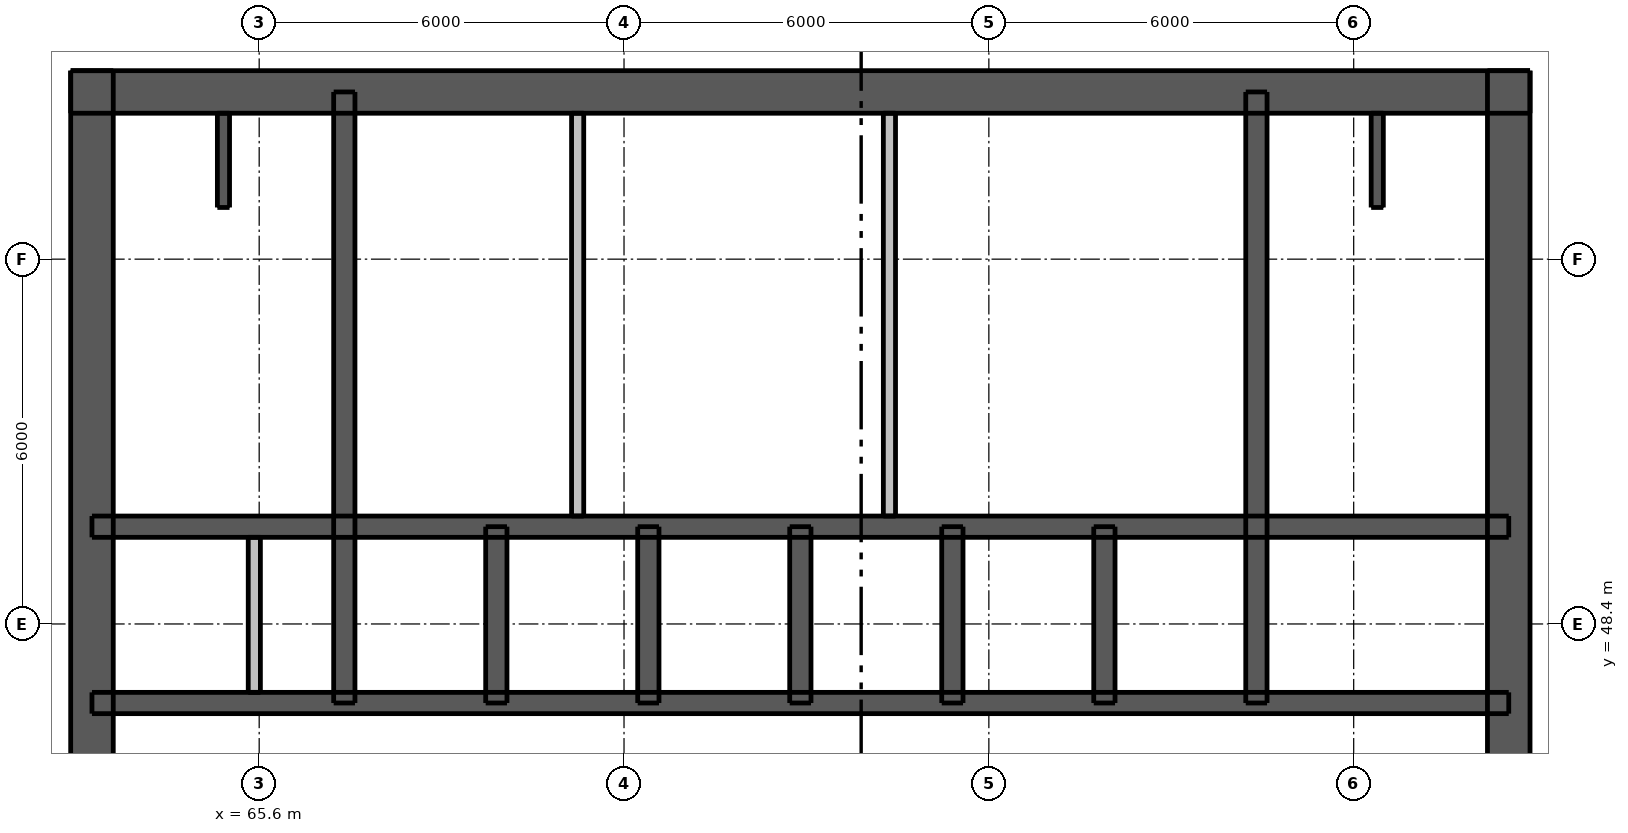
"""IFC4 building model, lengths in metres.
Left out: names, types, materials, properties, quantities, classifications, styles, units other than length and angle.
Written with IfcOpenShell. Run it as: python <this file> out.ifc"""

import sys

from ifc_helpers import new_model, si_unit, direction, frame, frame_2d, origin, place, context, subcontext, project, spatial, rectangle, extrude, element, fill, save


model = new_model("IFC4")
c1 = context("Model", 3, precision=1e-05, world=origin(), true_north=direction((0.0, 1.0)))
c2 = subcontext(c1, "Body", "Model", "MODEL_VIEW")
j1 = project(units=[si_unit("LENGTHUNIT", "METRE"), si_unit("PLANEANGLEUNIT", "RADIAN")], contexts=[c1])
p1 = place(None, origin())
s1 = spatial("IfcSite", under=j1, at=p1, CompositionType="ELEMENT")
p2 = place(p1, origin())
s2 = spatial("IfcBuilding", under=s1, at=p2, CompositionType="ELEMENT")
p3 = place(p2, frame((0.0, 0.0, 178.0)))
s3 = spatial("IfcBuildingStorey", under=s2, at=p3, CompositionType="ELEMENT", Elevation=178.0)
p4 = place(p3, frame((62.5, 57.15, 0.0), z_axis=(0.0, 0.0, 1.0), x_axis=(1.0, 0.0, 0.0)))
e1 = element("IfcWall", 1, at=p4, inside=s3, PredefinedType="SHEAR", context=c2, shape_type="SweptSolid", body=[
    extrude(rectangle(XDim=24.0, YDim=0.7, at=frame_2d((12.0, 0.0))), origin(), (0.0, 0.0, 1.0), 8.75),
])
p5 = place(p4, frame((19.875, 0.0, 0.0)))
e2 = element("IfcOpeningElement", 2, at=p5, cuts=e1, PredefinedType="OPENING", context=c2, shape_type="SweptSolid", body=[
    extrude(rectangle(XDim=1.1, YDim=2.1, at=frame_2d((0.55, 1.05))), frame((0.0, 0.36, 0.0), z_axis=(0.0, -1.0, 0.0), x_axis=(1.0, 0.0, 0.0)), (0.0, 0.0, 1.0), 0.72),
])
p6 = place(p4, frame((22.0, 0.0, 0.0)))
e3 = element("IfcOpeningElement", 3, at=p6, cuts=e1, PredefinedType="OPENING", context=c2, shape_type="SweptSolid", body=[
    extrude(rectangle(XDim=1.1, YDim=2.1, at=frame_2d((0.55, 1.05))), frame((0.0, 0.36, 0.0), z_axis=(0.0, -1.0, 0.0), x_axis=(1.0, 0.0, 0.0)), (0.0, 0.0, 1.0), 0.72),
])
p7 = place(p4, frame((0.9, 0.0, 0.0)))
e4 = element("IfcOpeningElement", 4, at=p7, cuts=e1, PredefinedType="OPENING", context=c2, shape_type="SweptSolid", body=[
    extrude(rectangle(XDim=1.1, YDim=2.1, at=frame_2d((0.55, 1.05))), frame((0.0, 0.36, 0.0), z_axis=(0.0, -1.0, 0.0), x_axis=(1.0, 0.0, 0.0)), (0.0, 0.0, 1.0), 0.72),
])
p8 = place(p4, frame((3.025, 0.0, 0.0)))
e5 = element("IfcOpeningElement", 5, at=p8, cuts=e1, PredefinedType="OPENING", context=c2, shape_type="SweptSolid", body=[
    extrude(rectangle(XDim=1.1, YDim=2.1, at=frame_2d((0.55, 1.05))), frame((0.0, 0.36, 0.0), z_axis=(0.0, -1.0, 0.0), x_axis=(1.0, 0.0, 0.0)), (0.0, 0.0, 1.0), 0.72),
])
p9 = place(p4, frame((6.056, 0.0, 0.0)))
e6 = element("IfcOpeningElement", 6, at=p9, cuts=e1, PredefinedType="OPENING", context=c2, shape_type="SweptSolid", body=[
    extrude(rectangle(XDim=0.9, YDim=2.1, at=frame_2d((0.45, 1.05))), frame((0.0, 0.36, 0.0), z_axis=(0.0, -1.0, 0.0), x_axis=(1.0, 0.0, 0.0)), (0.0, 0.0, 1.0), 0.72),
])
p10 = place(p4, frame((10.451, 0.0, 0.0)))
e7 = element("IfcOpeningElement", 7, at=p10, cuts=e1, PredefinedType="OPENING", context=c2, shape_type="SweptSolid", body=[
    extrude(rectangle(XDim=0.9, YDim=2.1, at=frame_2d((0.45, 1.05))), frame((0.0, 0.36, 0.0), z_axis=(0.0, -1.0, 0.0), x_axis=(1.0, 0.0, 0.0)), (0.0, 0.0, 1.0), 0.72),
])
p11 = place(p4, frame((16.115, 0.0, 0.0)))
e8 = element("IfcOpeningElement", 8, at=p11, cuts=e1, PredefinedType="OPENING", context=c2, shape_type="SweptSolid", body=[
    extrude(rectangle(XDim=0.9, YDim=2.1, at=frame_2d((0.45, 1.05))), frame((0.0, 0.36, 0.0), z_axis=(0.0, -1.0, 0.0), x_axis=(1.0, 0.0, 0.0)), (0.0, 0.0, 1.0), 0.72),
])
p12 = place(p3, frame((62.85, 33.5, 0.0), z_axis=(0.0, 0.0, 1.0), x_axis=(0.0, 1.0, 0.0)))
e9 = element("IfcWall", 9, at=p12, inside=s3, PredefinedType="SHEAR", context=c2, shape_type="SweptSolid", body=[
    extrude(rectangle(XDim=24.0, YDim=0.7, at=frame_2d((12.0, 0.0))), origin(), (0.0, 0.0, 1.0), 8.75),
])
p13 = place(p12, frame((11.2, 0.0, 0.0)))
e10 = element("IfcOpeningElement", 10, at=p13, cuts=e9, PredefinedType="OPENING", context=c2, shape_type="SweptSolid", body=[
    extrude(rectangle(XDim=1.6, YDim=2.1, at=frame_2d((0.8, 1.05))), frame((0.0, 0.36, 0.0), z_axis=(0.0, -1.0, 0.0), x_axis=(1.0, 0.0, 0.0)), (0.0, 0.0, 1.0), 0.72),
])
p14 = place(p3, frame((86.15, 33.5, 0.0), z_axis=(0.0, 0.0, 1.0), x_axis=(0.0, 1.0, 0.0)))
e11 = element("IfcWall", 11, at=p14, inside=s3, PredefinedType="SHEAR", context=c2, shape_type="SweptSolid", body=[
    extrude(rectangle(XDim=24.0, YDim=0.7, at=frame_2d((12.0, 0.0))), origin(), (0.0, 0.0, 1.0), 8.75),
])
p15 = place(p14, frame((11.2, 0.0, 0.0)))
e12 = element("IfcOpeningElement", 12, at=p15, cuts=e11, PredefinedType="OPENING", context=c2, shape_type="SweptSolid", body=[
    extrude(rectangle(XDim=1.6, YDim=2.1, at=frame_2d((0.8, 1.05))), frame((0.0, 0.36, 0.0), z_axis=(0.0, -1.0, 0.0), x_axis=(1.0, 0.0, 0.0)), (0.0, 0.0, 1.0), 0.72),
])
p16 = place(p3, frame((62.85, 47.1, 0.0), z_axis=(0.0, 0.0, 1.0), x_axis=(1.0, 0.0, 0.0)))
e13 = element("IfcWall", 13, at=p16, inside=s3, PredefinedType="SHEAR", context=c2, shape_type="SweptSolid", body=[
    extrude(rectangle(XDim=23.3, YDim=0.35, at=frame_2d((11.65, 0.0))), origin(), (0.0, 0.0, 1.0), 8.75),
])
p17 = place(p16, frame((1.06, 0.0, 0.0)))
e14 = element("IfcOpeningElement", 14, at=p17, cuts=e13, PredefinedType="OPENING", context=c2, shape_type="SweptSolid", body=[
    extrude(rectangle(XDim=0.9, YDim=2.1, at=frame_2d((0.45, 1.05))), frame((0.0, 0.185, 0.0), z_axis=(0.0, -1.0, 0.0), x_axis=(1.0, 0.0, 0.0)), (0.0, 0.0, 1.0), 0.37),
])
p18 = place(p16, frame((2.923, 0.0, 0.0)))
e15 = element("IfcOpeningElement", 15, at=p18, cuts=e13, PredefinedType="OPENING", context=c2, shape_type="SweptSolid", body=[
    extrude(rectangle(XDim=0.8, YDim=2.1, at=frame_2d((0.4, 1.05))), frame((0.0, 0.185, 0.0), z_axis=(0.0, -1.0, 0.0), x_axis=(1.0, 0.0, 0.0)), (0.0, 0.0, 1.0), 0.37),
])
p19 = place(p16, frame((20.688, 0.0, 0.0)))
e16 = element("IfcOpeningElement", 16, at=p19, cuts=e13, PredefinedType="OPENING", context=c2, shape_type="SweptSolid", body=[
    extrude(rectangle(XDim=0.9, YDim=2.1, at=frame_2d((0.45, 1.05))), frame((0.0, 0.185, 0.0), z_axis=(0.0, -1.0, 0.0), x_axis=(1.0, 0.0, 0.0)), (0.0, 0.0, 1.0), 0.37),
])
p20 = place(p16, frame((4.85, 0.0, 0.0)))
e17 = element("IfcOpeningElement", 17, at=p20, cuts=e13, PredefinedType="OPENING", context=c2, shape_type="SweptSolid", body=[
    extrude(rectangle(XDim=1.1, YDim=2.1, at=frame_2d((0.55, 1.05))), frame((0.0, 0.185, 0.0), z_axis=(0.0, -1.0, 0.0), x_axis=(1.0, 0.0, 0.0)), (0.0, 0.0, 1.0), 0.37),
])
p21 = place(p16, frame((7.35, 0.0, 0.0)))
e18 = element("IfcOpeningElement", 18, at=p21, cuts=e13, PredefinedType="OPENING", context=c2, shape_type="SweptSolid", body=[
    extrude(rectangle(XDim=1.1, YDim=2.1, at=frame_2d((0.55, 1.05))), frame((0.0, 0.185, 0.0), z_axis=(0.0, -1.0, 0.0), x_axis=(1.0, 0.0, 0.0)), (0.0, 0.0, 1.0), 0.37),
])
p22 = place(p16, frame((9.85, 0.0, 0.0)))
e19 = element("IfcOpeningElement", 19, at=p22, cuts=e13, PredefinedType="OPENING", context=c2, shape_type="SweptSolid", body=[
    extrude(rectangle(XDim=1.1, YDim=2.1, at=frame_2d((0.55, 1.05))), frame((0.0, 0.185, 0.0), z_axis=(0.0, -1.0, 0.0), x_axis=(1.0, 0.0, 0.0)), (0.0, 0.0, 1.0), 0.37),
])
p23 = place(p16, frame((12.35, 0.0, 0.0)))
e20 = element("IfcOpeningElement", 20, at=p23, cuts=e13, PredefinedType="OPENING", context=c2, shape_type="SweptSolid", body=[
    extrude(rectangle(XDim=1.1, YDim=2.1, at=frame_2d((0.55, 1.05))), frame((0.0, 0.185, 0.0), z_axis=(0.0, -1.0, 0.0), x_axis=(1.0, 0.0, 0.0)), (0.0, 0.0, 1.0), 0.37),
])
p24 = place(p16, frame((14.85, 0.0, 0.0)))
e21 = element("IfcOpeningElement", 21, at=p24, cuts=e13, PredefinedType="OPENING", context=c2, shape_type="SweptSolid", body=[
    extrude(rectangle(XDim=1.1, YDim=2.1, at=frame_2d((0.55, 1.05))), frame((0.0, 0.185, 0.0), z_axis=(0.0, -1.0, 0.0), x_axis=(1.0, 0.0, 0.0)), (0.0, 0.0, 1.0), 0.37),
])
p25 = place(p16, frame((17.35, 0.0, 0.0)))
e22 = element("IfcOpeningElement", 22, at=p25, cuts=e13, PredefinedType="OPENING", context=c2, shape_type="SweptSolid", body=[
    extrude(rectangle(XDim=1.1, YDim=2.1, at=frame_2d((0.55, 1.05))), frame((0.0, 0.185, 0.0), z_axis=(0.0, -1.0, 0.0), x_axis=(1.0, 0.0, 0.0)), (0.0, 0.0, 1.0), 0.37),
])
p26 = place(p3, frame((62.85, 50.0, 0.0), z_axis=(0.0, 0.0, 1.0), x_axis=(1.0, 0.0, 0.0)))
e23 = element("IfcWall", 23, at=p26, inside=s3, PredefinedType="SHEAR", context=c2, shape_type="SweptSolid", body=[
    extrude(rectangle(XDim=23.3, YDim=0.35, at=frame_2d((11.65, 0.0))), origin(), (0.0, 0.0, 1.0), 8.75),
])
for number, where, z_axis, x_axis in (
    (24, (67.0, 47.1, 0.0), (0.0, 0.0, 1.0), (0.0, 1.0, 0.0)),
    (25, (82.0, 47.1, 0.0), (0.0, 0.0, 1.0), (0.0, 1.0, 0.0)),
):
    element("IfcWall", number, at=place(p3, frame(where, z_axis=z_axis, x_axis=x_axis)), inside=s3, PredefinedType="SHEAR", context=c2, shape_type="SweptSolid", body=[
        extrude(rectangle(XDim=10.05, YDim=0.35, at=frame_2d((5.025, 0.0))), origin(), (0.0, 0.0, 1.0), 8.75),
    ])
for number, where, z_axis, x_axis in (
    (26, (69.5, 47.1, 0.0), (0.0, 0.0, 1.0), (0.0, 1.0, 0.0)),
    (27, (72.0, 47.1, 0.0), (0.0, 0.0, 1.0), (0.0, 1.0, 0.0)),
    (28, (74.5, 47.1, 0.0), (0.0, 0.0, 1.0), (0.0, 1.0, 0.0)),
    (29, (77.0, 47.1, 0.0), (0.0, 0.0, 1.0), (0.0, 1.0, 0.0)),
    (30, (79.5, 47.1, 0.0), (0.0, 0.0, 1.0), (0.0, 1.0, 0.0)),
):
    element("IfcWall", number, at=place(p3, frame(where, z_axis=z_axis, x_axis=x_axis)), inside=s3, PredefinedType="SHEAR", context=c2, shape_type="SweptSolid", body=[
        extrude(rectangle(XDim=2.9, YDim=0.35, at=frame_2d((1.45, 0.0))), origin(), (0.0, 0.0, 1.0), 8.75),
    ])
p27 = place(p3, frame((65.52, 47.275, 0.0), z_axis=(0.0, 0.0, 1.0), x_axis=(0.0, 1.0, 0.0)))
e31 = element("IfcWall", 31, at=p27, inside=s3, PredefinedType="PLUMBINGWALL", context=c2, shape_type="SweptSolid", body=[
    extrude(rectangle(XDim=2.55, YDim=0.2, at=frame_2d((1.275, 0.0))), origin(), (0.0, 0.0, 1.0), 8.75),
])
for number, where, z_axis, x_axis in (
    (32, (70.837, 50.175, 0.0), (0.0, 0.0, 1.0), (0.0, 1.0, 0.0)),
    (33, (75.965, 50.175, 0.0), (0.0, 0.0, 1.0), (0.0, 1.0, 0.0)),
):
    element("IfcWall", number, at=place(p3, frame(where, z_axis=z_axis, x_axis=x_axis)), inside=s3, PredefinedType="PLUMBINGWALL", context=c2, shape_type="SweptSolid", body=[
        extrude(rectangle(XDim=6.625, YDim=0.2, at=frame_2d((3.312, 0.0))), origin(), (0.0, 0.0, 1.0), 8.75),
    ])
for number, where, z_axis, x_axis in (
    (34, (83.988, 56.8, 0.0), (0.0, 0.0, 1.0), (0.0, -1.0, 0.0)),
    (35, (65.012, 56.8, 0.0), (0.0, 0.0, 1.0), (0.0, -1.0, 0.0)),
):
    element("IfcWall", number, at=place(p3, frame(where, z_axis=z_axis, x_axis=x_axis)), inside=s3, PredefinedType="SHEAR", context=c2, shape_type="SweptSolid", body=[
        extrude(rectangle(XDim=1.55, YDim=0.2, at=frame_2d((0.775, 0.0))), origin(), (0.0, 0.0, 1.0), 8.75),
    ])
p28 = place(p5, origin())
e36 = element("IfcDoor", 36, at=p28, inside=s3, OperationType="SINGLE_SWING_RIGHT", PredefinedType="DOOR", context=c2, shape_type="SweptSolid", body=[
    extrude(rectangle(XDim=1.1, YDim=2.1, at=frame_2d((0.55, 1.05))), frame((0.0, -0.288, 0.0), z_axis=(0.0, -1.0, 0.0), x_axis=(1.0, 0.0, 0.0)), (0.0, 0.0, 1.0), 0.05),
])
fill(e2, e36)
p29 = place(p6, origin())
e37 = element("IfcDoor", 37, at=p29, inside=s3, OperationType="SINGLE_SWING_RIGHT", PredefinedType="DOOR", context=c2, shape_type="SweptSolid", body=[
    extrude(rectangle(XDim=1.1, YDim=2.1, at=frame_2d((0.55, 1.05))), frame((0.0, -0.288, 0.0), z_axis=(0.0, -1.0, 0.0), x_axis=(1.0, 0.0, 0.0)), (0.0, 0.0, 1.0), 0.05),
])
fill(e3, e37)
p30 = place(p7, origin())
e38 = element("IfcDoor", 38, at=p30, inside=s3, OperationType="SINGLE_SWING_LEFT", PredefinedType="DOOR", context=c2, shape_type="SweptSolid", body=[
    extrude(rectangle(XDim=1.1, YDim=2.1, at=frame_2d((0.55, 1.05))), frame((0.0, -0.288, 0.0), z_axis=(0.0, -1.0, 0.0), x_axis=(1.0, 0.0, 0.0)), (0.0, 0.0, 1.0), 0.05),
])
fill(e4, e38)
p31 = place(p8, origin())
e39 = element("IfcDoor", 39, at=p31, inside=s3, OperationType="SINGLE_SWING_LEFT", PredefinedType="DOOR", context=c2, shape_type="SweptSolid", body=[
    extrude(rectangle(XDim=1.1, YDim=2.1, at=frame_2d((0.55, 1.05))), frame((0.0, -0.288, 0.0), z_axis=(0.0, -1.0, 0.0), x_axis=(1.0, 0.0, 0.0)), (0.0, 0.0, 1.0), 0.05),
])
fill(e5, e39)
p32 = place(p13, origin())
e40 = element("IfcDoor", 40, at=p32, inside=s3, OperationType="DOUBLE_DOOR_SINGLE_SWING", PredefinedType="DOOR", context=c2, shape_type="SweptSolid", body=[
    extrude(rectangle(XDim=1.6, YDim=2.1, at=frame_2d((0.8, 1.05))), frame((0.0, -0.288, 0.0), z_axis=(0.0, -1.0, 0.0), x_axis=(1.0, 0.0, 0.0)), (0.0, 0.0, 1.0), 0.05),
])
fill(e10, e40)
p33 = place(p15, origin())
e41 = element("IfcDoor", 41, at=p33, inside=s3, OperationType="DOUBLE_DOOR_SINGLE_SWING", PredefinedType="DOOR", context=c2, shape_type="SweptSolid", body=[
    extrude(rectangle(XDim=1.6, YDim=2.1, at=frame_2d((0.8, 1.05))), frame((0.0, 0.337, 0.0), z_axis=(0.0, -1.0, 0.0), x_axis=(1.0, 0.0, 0.0)), (0.0, 0.0, 1.0), 0.05),
])
fill(e12, e41)
p34 = place(p17, origin())
e42 = element("IfcDoor", 42, at=p34, inside=s3, OperationType="SINGLE_SWING_LEFT", PredefinedType="DOOR", context=c2, shape_type="SweptSolid", body=[
    extrude(rectangle(XDim=0.9, YDim=2.1, at=frame_2d((0.45, 1.05))), frame((0.0, 0.163, 0.0), z_axis=(0.0, -1.0, 0.0), x_axis=(1.0, 0.0, 0.0)), (0.0, 0.0, 1.0), 0.05),
])
fill(e14, e42)
p35 = place(p18, origin())
e43 = element("IfcDoor", 43, at=p35, inside=s3, OperationType="SINGLE_SWING_RIGHT", PredefinedType="DOOR", context=c2, shape_type="SweptSolid", body=[
    extrude(rectangle(XDim=0.8, YDim=2.1, at=frame_2d((0.4, 1.05))), frame((0.0, 0.163, 0.0), z_axis=(0.0, -1.0, 0.0), x_axis=(1.0, 0.0, 0.0)), (0.0, 0.0, 1.0), 0.05),
])
fill(e15, e43)
p36 = place(p19, origin())
e44 = element("IfcDoor", 44, at=p36, inside=s3, OperationType="SINGLE_SWING_LEFT", PredefinedType="DOOR", context=c2, shape_type="SweptSolid", body=[
    extrude(rectangle(XDim=0.9, YDim=2.1, at=frame_2d((0.45, 1.05))), frame((0.0, 0.163, 0.0), z_axis=(0.0, -1.0, 0.0), x_axis=(1.0, 0.0, 0.0)), (0.0, 0.0, 1.0), 0.05),
])
fill(e16, e44)
p37 = place(p9, origin())
e45 = element("IfcDoor", 45, at=p37, inside=s3, OperationType="SINGLE_SWING_RIGHT", PredefinedType="DOOR", context=c2, shape_type="SweptSolid", body=[
    extrude(rectangle(XDim=0.9, YDim=2.1, at=frame_2d((0.45, 1.05))), frame((0.0, -0.288, 0.0), z_axis=(0.0, -1.0, 0.0), x_axis=(1.0, 0.0, 0.0)), (0.0, 0.0, 1.0), 0.05),
])
fill(e6, e45)
p38 = place(p10, origin())
e46 = element("IfcDoor", 46, at=p38, inside=s3, OperationType="SINGLE_SWING_RIGHT", PredefinedType="DOOR", context=c2, shape_type="SweptSolid", body=[
    extrude(rectangle(XDim=0.9, YDim=2.1, at=frame_2d((0.45, 1.05))), frame((0.0, -0.288, 0.0), z_axis=(0.0, -1.0, 0.0), x_axis=(1.0, 0.0, 0.0)), (0.0, 0.0, 1.0), 0.05),
])
fill(e7, e46)
p39 = place(p11, origin())
e47 = element("IfcDoor", 47, at=p39, inside=s3, OperationType="SINGLE_SWING_RIGHT", PredefinedType="DOOR", context=c2, shape_type="SweptSolid", body=[
    extrude(rectangle(XDim=0.9, YDim=2.1, at=frame_2d((0.45, 1.05))), frame((0.0, -0.288, 0.0), z_axis=(0.0, -1.0, 0.0), x_axis=(1.0, 0.0, 0.0)), (0.0, 0.0, 1.0), 0.05),
])
fill(e8, e47)
p40 = place(p20, origin())
e48 = element("IfcDoor", 48, at=p40, inside=s3, OperationType="DOUBLE_DOOR_SLIDING", PredefinedType="DOOR", context=c2, shape_type="SweptSolid", body=[
    extrude(rectangle(XDim=1.1, YDim=2.1, at=frame_2d((0.55, 1.05))), frame((0.0, 0.025, 0.0), z_axis=(0.0, -1.0, 0.0), x_axis=(1.0, 0.0, 0.0)), (0.0, 0.0, 1.0), 0.05),
])
fill(e17, e48)
p41 = place(p21, origin())
e49 = element("IfcDoor", 49, at=p41, inside=s3, OperationType="DOUBLE_DOOR_SLIDING", PredefinedType="DOOR", context=c2, shape_type="SweptSolid", body=[
    extrude(rectangle(XDim=1.1, YDim=2.1, at=frame_2d((0.55, 1.05))), frame((0.0, 0.025, 0.0), z_axis=(0.0, -1.0, 0.0), x_axis=(1.0, 0.0, 0.0)), (0.0, 0.0, 1.0), 0.05),
])
fill(e18, e49)
p42 = place(p22, origin())
e50 = element("IfcDoor", 50, at=p42, inside=s3, OperationType="DOUBLE_DOOR_SLIDING", PredefinedType="DOOR", context=c2, shape_type="SweptSolid", body=[
    extrude(rectangle(XDim=1.1, YDim=2.1, at=frame_2d((0.55, 1.05))), frame((0.0, 0.025, 0.0), z_axis=(0.0, -1.0, 0.0), x_axis=(1.0, 0.0, 0.0)), (0.0, 0.0, 1.0), 0.05),
])
fill(e19, e50)
p43 = place(p23, origin())
e51 = element("IfcDoor", 51, at=p43, inside=s3, OperationType="DOUBLE_DOOR_SLIDING", PredefinedType="DOOR", context=c2, shape_type="SweptSolid", body=[
    extrude(rectangle(XDim=1.1, YDim=2.1, at=frame_2d((0.55, 1.05))), frame((0.0, 0.025, 0.0), z_axis=(0.0, -1.0, 0.0), x_axis=(1.0, 0.0, 0.0)), (0.0, 0.0, 1.0), 0.05),
])
fill(e20, e51)
p44 = place(p24, origin())
e52 = element("IfcDoor", 52, at=p44, inside=s3, OperationType="DOUBLE_DOOR_SLIDING", PredefinedType="DOOR", context=c2, shape_type="SweptSolid", body=[
    extrude(rectangle(XDim=1.1, YDim=2.1, at=frame_2d((0.55, 1.05))), frame((0.0, 0.025, 0.0), z_axis=(0.0, -1.0, 0.0), x_axis=(1.0, 0.0, 0.0)), (0.0, 0.0, 1.0), 0.05),
])
fill(e21, e52)
p45 = place(p25, origin())
e53 = element("IfcDoor", 53, at=p45, inside=s3, OperationType="DOUBLE_DOOR_SLIDING", PredefinedType="DOOR", context=c2, shape_type="SweptSolid", body=[
    extrude(rectangle(XDim=1.1, YDim=2.1, at=frame_2d((0.55, 1.05))), frame((0.0, 0.025, 0.0), z_axis=(0.0, -1.0, 0.0), x_axis=(1.0, 0.0, 0.0)), (0.0, 0.0, 1.0), 0.05),
])
fill(e22, e53)
save(model, sys.argv[1])
